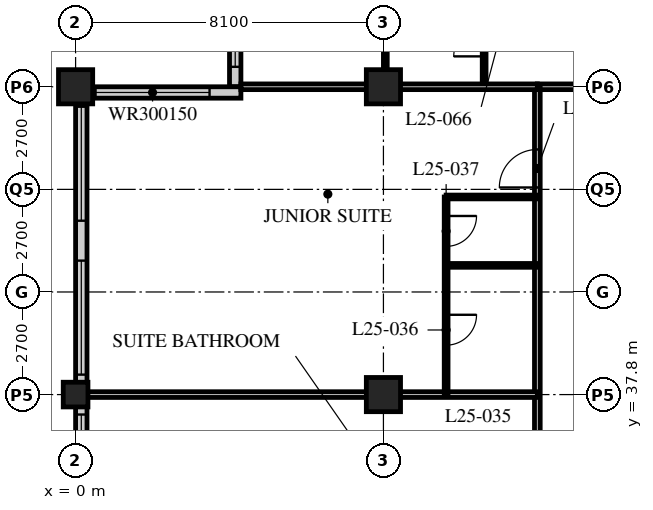
"""IFC4 building model, lengths in metres.
Left out: names, types, materials, properties, quantities, classifications, styles, units other than length and angle.
Written with IfcOpenShell. Run it as: python <this file> out.ifc"""

import sys

from ifc_helpers import new_model, si_unit, direction, frame, frame_2d, origin, origin_2d, place, context, subcontext, project, spatial, rectangle, hollow_rectangle, extrude, element, fill, save


model = new_model("IFC4")
c1 = context("Model", 3, precision=1e-05, world=origin(), true_north=direction((0.0, 1.0)))
c2 = subcontext(c1, "Body", "Model", "MODEL_VIEW")
j1 = project(units=[si_unit("LENGTHUNIT", "METRE"), si_unit("PLANEANGLEUNIT", "RADIAN")], contexts=[c1])
p1 = place(None, origin())
s1 = spatial("IfcSite", under=j1, at=p1, CompositionType="ELEMENT")
p2 = place(p1, origin())
s2 = spatial("IfcBuilding", under=s1, at=p2, CompositionType="ELEMENT")
p3 = place(p2, frame((0.0, 0.0, 103.4)))
s3 = spatial("IfcBuildingStorey", under=s2, at=p3, CompositionType="ELEMENT", Elevation=103.4)
p4 = place(p3, frame((0.0, 37.8, 0.0), z_axis=(0.0, 0.0, 1.0), x_axis=(1.0, 0.0, 0.0)))
e1 = element("IfcColumn", 1, at=p4, inside=s3, PredefinedType="COLUMN", context=c2, shape_type="SweptSolid", body=[
    extrude(hollow_rectangle(XDim=0.65, YDim=0.65, WallThickness=0.055, at=origin_2d()), origin(), (0.0, 0.0, 1.0), 3.4),
])
p5 = place(p3, frame((0.0, 45.9, 0.0), z_axis=(0.0, 0.0, 1.0), x_axis=(1.0, 0.0, 0.0)))
e2 = element("IfcColumn", 2, at=p5, inside=s3, PredefinedType="COLUMN", context=c2, shape_type="SweptSolid", body=[
    extrude(hollow_rectangle(XDim=0.9, YDim=0.9, WallThickness=0.09, at=origin_2d()), origin(), (0.0, 0.0, 1.0), 3.4),
])
for number, where, z_axis, x_axis in (
    (3, (8.1, 37.8, 0.0), (0.0, 0.0, 1.0), (1.0, 0.0, 0.0)),
    (4, (8.1, 45.9, 0.0), (0.0, 0.0, 1.0), (1.0, 0.0, 0.0)),
):
    element("IfcColumn", number, at=place(p3, frame(where, z_axis=z_axis, x_axis=x_axis)), inside=s3, PredefinedType="COLUMN", context=c2, shape_type="SweptSolid", body=[
        extrude(hollow_rectangle(XDim=0.9, YDim=0.9, WallThickness=0.1, at=origin_2d()), origin(), (0.0, 0.0, 1.0), 3.4),
    ])
p6 = place(p3, frame((4.2, 49.65, 0.0), z_axis=(0.0, 0.0, 1.0), x_axis=(0.0, -1.0, 0.0)))
e5 = element("IfcWall", 5, at=p6, inside=s3, PredefinedType="SOLIDWALL", context=c2, shape_type="SweptSolid", body=[
    extrude(rectangle(XDim=3.75, YDim=0.3, at=frame_2d((1.875, 0.0))), origin(), (0.0, 0.0, 1.0), 3.19),
])
p7 = place(p6, frame((0.225, 0.0, 0.9)))
e6 = element("IfcOpeningElement", 6, at=p7, cuts=e5, PredefinedType="OPENING", context=c2, shape_type="SweptSolid", body=[
    extrude(rectangle(XDim=3.0, YDim=1.5, at=frame_2d((1.5, 0.75))), frame((0.0, 0.16, 0.0), z_axis=(0.0, -1.0, 0.0), x_axis=(1.0, 0.0, 0.0)), (0.0, 0.0, 1.0), 0.32),
])
p8 = place(p3, frame((4.35, 45.75, 0.0), z_axis=(0.0, 0.0, 1.0), x_axis=(-1.0, 0.0, 0.0)))
e7 = element("IfcWall", 7, at=p8, inside=s3, PredefinedType="SOLIDWALL", context=c2, shape_type="SweptSolid", body=[
    extrude(rectangle(XDim=4.35, YDim=0.3, at=frame_2d((2.175, 0.0))), origin(), (0.0, 0.0, 1.0), 3.19),
])
p9 = place(p8, frame((0.825, 0.0, 0.9)))
e8 = element("IfcOpeningElement", 8, at=p9, cuts=e7, PredefinedType="OPENING", context=c2, shape_type="SweptSolid", body=[
    extrude(rectangle(XDim=3.0, YDim=1.5, at=frame_2d((1.5, 0.75))), frame((0.0, 0.16, 0.0), z_axis=(0.0, -1.0, 0.0), x_axis=(1.0, 0.0, 0.0)), (0.0, 0.0, 1.0), 0.32),
])
p10 = place(p3, frame((0.15, 45.6, 0.0), z_axis=(0.0, 0.0, 1.0), x_axis=(0.0, -1.0, 0.0)))
e9 = element("IfcWall", 9, at=p10, inside=s3, PredefinedType="SOLIDWALL", context=c2, shape_type="SweptSolid", body=[
    extrude(rectangle(XDim=32.1, YDim=0.3, at=frame_2d((16.05, 0.0))), origin(), (0.0, 0.0, 1.0), 3.19),
])
p11 = place(p10, frame((0.225, 0.0, 0.9)))
e10 = element("IfcOpeningElement", 10, at=p11, cuts=e9, PredefinedType="OPENING", context=c2, shape_type="SweptSolid", body=[
    extrude(rectangle(XDim=3.0, YDim=2.0, at=frame_2d((1.5, 1.0))), frame((0.0, 0.16, 0.0), z_axis=(0.0, -1.0, 0.0), x_axis=(1.0, 0.0, 0.0)), (0.0, 0.0, 1.0), 0.32),
])
p12 = place(p10, frame((4.275, 0.0, 0.9)))
e11 = element("IfcOpeningElement", 11, at=p12, cuts=e9, PredefinedType="OPENING", context=c2, shape_type="SweptSolid", body=[
    extrude(rectangle(XDim=3.0, YDim=2.0, at=frame_2d((1.5, 1.0))), frame((0.0, 0.16, 0.0), z_axis=(0.0, -1.0, 0.0), x_axis=(1.0, 0.0, 0.0)), (0.0, 0.0, 1.0), 0.32),
])
p13 = place(p10, frame((8.325, 0.0, 0.9)))
e12 = element("IfcOpeningElement", 12, at=p13, cuts=e9, PredefinedType="OPENING", context=c2, shape_type="SweptSolid", body=[
    extrude(rectangle(XDim=3.0, YDim=2.0, at=frame_2d((1.5, 1.0))), frame((0.0, 0.16, 0.0), z_axis=(0.0, -1.0, 0.0), x_axis=(1.0, 0.0, 0.0)), (0.0, 0.0, 1.0), 0.32),
])
p14 = place(p10, frame((12.375, 0.0, 0.9)))
e13 = element("IfcOpeningElement", 13, at=p14, cuts=e9, PredefinedType="OPENING", context=c2, shape_type="SweptSolid", body=[
    extrude(rectangle(XDim=3.0, YDim=2.0, at=frame_2d((1.5, 1.0))), frame((0.0, 0.16, 0.0), z_axis=(0.0, -1.0, 0.0), x_axis=(1.0, 0.0, 0.0)), (0.0, 0.0, 1.0), 0.32),
])
p15 = place(p10, frame((16.425, 0.0, 0.9)))
e14 = element("IfcOpeningElement", 14, at=p15, cuts=e9, PredefinedType="OPENING", context=c2, shape_type="SweptSolid", body=[
    extrude(rectangle(XDim=3.0, YDim=2.0, at=frame_2d((1.5, 1.0))), frame((0.0, 0.16, 0.0), z_axis=(0.0, -1.0, 0.0), x_axis=(1.0, 0.0, 0.0)), (0.0, 0.0, 1.0), 0.32),
])
p16 = place(p10, frame((20.475, 0.0, 0.9)))
e15 = element("IfcOpeningElement", 15, at=p16, cuts=e9, PredefinedType="OPENING", context=c2, shape_type="SweptSolid", body=[
    extrude(rectangle(XDim=3.0, YDim=2.0, at=frame_2d((1.5, 1.0))), frame((0.0, 0.16, 0.0), z_axis=(0.0, -1.0, 0.0), x_axis=(1.0, 0.0, 0.0)), (0.0, 0.0, 1.0), 0.32),
])
p17 = place(p10, frame((24.525, 0.0, 0.9)))
e16 = element("IfcOpeningElement", 16, at=p17, cuts=e9, PredefinedType="OPENING", context=c2, shape_type="SweptSolid", body=[
    extrude(rectangle(XDim=3.0, YDim=2.0, at=frame_2d((1.5, 1.0))), frame((0.0, 0.16, 0.0), z_axis=(0.0, -1.0, 0.0), x_axis=(1.0, 0.0, 0.0)), (0.0, 0.0, 1.0), 0.32),
])
p18 = place(p10, frame((28.575, 0.0, 0.9)))
e17 = element("IfcOpeningElement", 17, at=p18, cuts=e9, PredefinedType="OPENING", context=c2, shape_type="SweptSolid", body=[
    extrude(rectangle(XDim=3.0, YDim=2.0, at=frame_2d((1.5, 1.0))), frame((0.0, 0.16, 0.0), z_axis=(0.0, -1.0, 0.0), x_axis=(1.0, 0.0, 0.0)), (0.0, 0.0, 1.0), 0.32),
])
p19 = place(p3, frame((12.15, 45.9, 0.0), z_axis=(0.0, 0.0, 1.0), x_axis=(1.0, 0.0, 0.0)))
e18 = element("IfcWall", 18, at=p19, inside=s3, PredefinedType="PARTITIONING", context=c2, shape_type="SweptSolid", body=[
    extrude(rectangle(XDim=32.4, YDim=0.15, at=frame_2d((16.2, 0.0))), origin(), (0.0, 0.0, 1.0), 2.578),
])
p20 = place(p19, frame((9.5, 0.0, 0.0)))
e19 = element("IfcOpeningElement", 19, at=p20, cuts=e18, PredefinedType="OPENING", context=c2, shape_type="SweptSolid", body=[
    extrude(rectangle(XDim=1.0, YDim=2.1, at=frame_2d((0.5, 1.05))), frame((0.0, 0.085, 0.0), z_axis=(0.0, -1.0, 0.0), x_axis=(1.0, 0.0, 0.0)), (0.0, 0.0, 1.0), 0.17),
])
p21 = place(p19, frame((17.6, 0.0, 0.0)))
e20 = element("IfcOpeningElement", 20, at=p21, cuts=e18, PredefinedType="OPENING", context=c2, shape_type="SweptSolid", body=[
    extrude(rectangle(XDim=1.0, YDim=2.1, at=frame_2d((0.5, 1.05))), frame((0.0, 0.085, 0.0), z_axis=(0.0, -1.0, 0.0), x_axis=(1.0, 0.0, 0.0)), (0.0, 0.0, 1.0), 0.17),
])
p22 = place(p19, frame((25.7, 0.0, 0.0)))
e21 = element("IfcOpeningElement", 21, at=p22, cuts=e18, PredefinedType="OPENING", context=c2, shape_type="SweptSolid", body=[
    extrude(rectangle(XDim=1.0, YDim=2.1, at=frame_2d((0.5, 1.05))), frame((0.0, 0.085, 0.0), z_axis=(0.0, -1.0, 0.0), x_axis=(1.0, 0.0, 0.0)), (0.0, 0.0, 1.0), 0.17),
])
p23 = place(p19, frame((29.875, 0.0, 0.0)))
e22 = element("IfcOpeningElement", 22, at=p23, cuts=e18, PredefinedType="OPENING", context=c2, shape_type="SweptSolid", body=[
    extrude(rectangle(XDim=1.0, YDim=2.1, at=frame_2d((0.5, 1.05))), frame((0.0, 0.085, 0.0), z_axis=(0.0, -1.0, 0.0), x_axis=(1.0, 0.0, 0.0)), (0.0, 0.0, 1.0), 0.17),
])
p24 = place(p19, frame((1.525, 0.0, 0.0)))
e23 = element("IfcOpeningElement", 23, at=p24, cuts=e18, PredefinedType="OPENING", context=c2, shape_type="SweptSolid", body=[
    extrude(rectangle(XDim=1.0, YDim=2.1, at=frame_2d((0.5, 1.05))), frame((0.0, 0.085, 0.0), z_axis=(0.0, -1.0, 0.0), x_axis=(1.0, 0.0, 0.0)), (0.0, 0.0, 1.0), 0.17),
])
p25 = place(p3, frame((12.15, 21.6, 0.0), z_axis=(0.0, 0.0, 1.0), x_axis=(0.0, 1.0, 0.0)))
e24 = element("IfcWall", 24, at=p25, inside=s3, PredefinedType="PARTITIONING", context=c2, shape_type="SweptSolid", body=[
    extrude(rectangle(XDim=24.3, YDim=0.15, at=frame_2d((12.15, 0.0))), origin(), (0.0, 0.0, 1.0), 3.19),
])
p26 = place(p25, frame((5.45, 0.0, 0.0)))
e25 = element("IfcOpeningElement", 25, at=p26, cuts=e24, PredefinedType="OPENING", context=c2, shape_type="SweptSolid", body=[
    extrude(rectangle(XDim=1.0, YDim=2.1, at=frame_2d((0.5, 1.05))), frame((0.0, 0.085, 0.0), z_axis=(0.0, -1.0, 0.0), x_axis=(1.0, 0.0, 0.0)), (0.0, 0.0, 1.0), 0.17),
])
p27 = place(p25, frame((13.55, 0.0, 0.0)))
e26 = element("IfcOpeningElement", 26, at=p27, cuts=e24, PredefinedType="OPENING", context=c2, shape_type="SweptSolid", body=[
    extrude(rectangle(XDim=1.0, YDim=2.1, at=frame_2d((0.5, 1.05))), frame((0.0, 0.085, 0.0), z_axis=(0.0, -1.0, 0.0), x_axis=(1.0, 0.0, 0.0)), (0.0, 0.0, 1.0), 0.17),
])
p28 = place(p25, frame((21.65, 0.0, 0.0)))
e27 = element("IfcOpeningElement", 27, at=p28, cuts=e24, PredefinedType="OPENING", context=c2, shape_type="SweptSolid", body=[
    extrude(rectangle(XDim=1.0, YDim=2.1, at=frame_2d((0.5, 1.05))), frame((0.0, 0.085, 0.0), z_axis=(0.0, -1.0, 0.0), x_axis=(1.0, 0.0, 0.0)), (0.0, 0.0, 1.0), 0.17),
])
p29 = place(p3, frame((12.15, 37.8, 0.0), z_axis=(0.0, 0.0, 1.0), x_axis=(-1.0, 0.0, 0.0)))
e28 = element("IfcWall", 28, at=p29, inside=s3, PredefinedType="PARTITIONING", context=c2, shape_type="SweptSolid", body=[
    extrude(rectangle(XDim=11.85, YDim=0.15, at=frame_2d((5.925, 0.0))), origin(), (0.0, 0.0, 1.0), 2.578),
])
p30 = place(p3, frame((9.75, 37.8, 0.0), z_axis=(0.0, 0.0, 1.0), x_axis=(0.0, 1.0, 0.0)))
e29 = element("IfcWall", 29, at=p30, inside=s3, PredefinedType="PARTITIONING", context=c2, shape_type="SweptSolid", body=[
    extrude(rectangle(XDim=5.2, YDim=0.1, at=frame_2d((2.6, 0.0))), origin(), (0.0, 0.0, 1.0), 3.19),
])
p31 = place(p30, frame((1.3, 0.0, 0.0)))
e30 = element("IfcOpeningElement", 30, at=p31, cuts=e29, PredefinedType="OPENING", context=c2, shape_type="SweptSolid", body=[
    extrude(rectangle(XDim=0.8, YDim=2.1, at=frame_2d((0.4, 1.05))), frame((0.0, 0.06, 0.0), z_axis=(0.0, -1.0, 0.0), x_axis=(1.0, 0.0, 0.0)), (0.0, 0.0, 1.0), 0.12),
])
p32 = place(p30, frame((3.9, 0.0, 0.0)))
e31 = element("IfcOpeningElement", 31, at=p32, cuts=e29, PredefinedType="OPENING", context=c2, shape_type="SweptSolid", body=[
    extrude(rectangle(XDim=0.8, YDim=2.1, at=frame_2d((0.4, 1.05))), frame((0.0, 0.06, 0.0), z_axis=(0.0, -1.0, 0.0), x_axis=(1.0, 0.0, 0.0)), (0.0, 0.0, 1.0), 0.12),
])
for number, where, z_axis, x_axis in (
    (32, (12.15, 41.2, 0.0), (0.0, 0.0, 1.0), (-1.0, 0.0, 0.0)),
    (33, (12.15, 43.0, 0.0), (0.0, 0.0, 1.0), (-1.0, 0.0, 0.0)),
):
    element("IfcWall", number, at=place(p3, frame(where, z_axis=z_axis, x_axis=x_axis)), inside=s3, PredefinedType="PARTITIONING", context=c2, shape_type="SweptSolid", body=[
        extrude(rectangle(XDim=2.4, YDim=0.1, at=frame_2d((1.2, 0.0))), origin(), (0.0, 0.0, 1.0), 3.19),
    ])
p33 = place(p3, frame((10.75, 45.9, 0.0), z_axis=(0.0, 0.0, 1.0), x_axis=(0.0, 1.0, 0.0)))
e34 = element("IfcWall", 34, at=p33, inside=s3, PredefinedType="PARTITIONING", context=c2, shape_type="SweptSolid", body=[
    extrude(rectangle(XDim=2.4, YDim=0.1, at=frame_2d((1.2, 0.0))), origin(), (0.0, 0.0, 1.0), 3.19),
])
p34 = place(p33, frame((0.8, 0.0, 0.0)))
e35 = element("IfcOpeningElement", 35, at=p34, cuts=e34, PredefinedType="OPENING", context=c2, shape_type="SweptSolid", body=[
    extrude(rectangle(XDim=0.8, YDim=2.1, at=frame_2d((0.4, 1.05))), frame((0.0, 0.06, 0.0), z_axis=(0.0, -1.0, 0.0), x_axis=(1.0, 0.0, 0.0)), (0.0, 0.0, 1.0), 0.12),
])
p35 = place(p3, frame((8.15, 45.9, 0.0), z_axis=(0.0, 0.0, 1.0), x_axis=(0.0, 1.0, 0.0)))
e36 = element("IfcWall", 36, at=p35, inside=s3, PredefinedType="PARTITIONING", context=c2, shape_type="SweptSolid", body=[
    extrude(rectangle(XDim=2.4, YDim=0.1, at=frame_2d((1.2, 0.0))), origin(), (0.0, 0.0, 1.0), 2.64),
])
p36 = place(p3, frame((4.35, 45.9, 0.0), z_axis=(0.0, 0.0, 1.0), x_axis=(1.0, 0.0, 0.0)))
e37 = element("IfcWall", 37, at=p36, inside=s3, PredefinedType="PARTITIONING", context=c2, shape_type="SweptSolid", body=[
    extrude(rectangle(XDim=7.8, YDim=0.15, at=frame_2d((3.9, 0.0))), origin(), (0.0, 0.0, 1.0), 2.578),
])
p37 = place(p7, origin())
e38 = element("IfcWindow", 38, at=p37, inside=s3, PartitioningType="SINGLE_PANEL", PredefinedType="WINDOW", context=c2, shape_type="SweptSolid", body=[
    extrude(rectangle(XDim=3.0, YDim=1.5, at=frame_2d((1.5, 0.75))), frame((0.0, 0.03, 0.0), z_axis=(0.0, -1.0, 0.0), x_axis=(1.0, 0.0, 0.0)), (0.0, 0.0, 1.0), 0.06),
])
fill(e6, e38)
p38 = place(p9, origin())
e39 = element("IfcWindow", 39, at=p38, inside=s3, PartitioningType="SINGLE_PANEL", PredefinedType="WINDOW", context=c2, shape_type="SweptSolid", body=[
    extrude(rectangle(XDim=3.0, YDim=1.5, at=frame_2d((1.5, 0.75))), frame((0.0, 0.03, 0.0), z_axis=(0.0, -1.0, 0.0), x_axis=(1.0, 0.0, 0.0)), (0.0, 0.0, 1.0), 0.06),
])
fill(e8, e39)
p39 = place(p11, origin())
e40 = element("IfcWindow", 40, at=p39, inside=s3, PartitioningType="SINGLE_PANEL", PredefinedType="WINDOW", context=c2, shape_type="SweptSolid", body=[
    extrude(rectangle(XDim=3.0, YDim=2.0, at=frame_2d((1.5, 1.0))), frame((0.0, 0.03, 0.0), z_axis=(0.0, -1.0, 0.0), x_axis=(1.0, 0.0, 0.0)), (0.0, 0.0, 1.0), 0.06),
])
fill(e10, e40)
p40 = place(p12, origin())
e41 = element("IfcWindow", 41, at=p40, inside=s3, PartitioningType="SINGLE_PANEL", PredefinedType="WINDOW", context=c2, shape_type="SweptSolid", body=[
    extrude(rectangle(XDim=3.0, YDim=2.0, at=frame_2d((1.5, 1.0))), frame((0.0, 0.03, 0.0), z_axis=(0.0, -1.0, 0.0), x_axis=(1.0, 0.0, 0.0)), (0.0, 0.0, 1.0), 0.06),
])
fill(e11, e41)
p41 = place(p13, origin())
e42 = element("IfcWindow", 42, at=p41, inside=s3, PartitioningType="SINGLE_PANEL", PredefinedType="WINDOW", context=c2, shape_type="SweptSolid", body=[
    extrude(rectangle(XDim=3.0, YDim=2.0, at=frame_2d((1.5, 1.0))), frame((0.0, 0.03, 0.0), z_axis=(0.0, -1.0, 0.0), x_axis=(1.0, 0.0, 0.0)), (0.0, 0.0, 1.0), 0.06),
])
fill(e12, e42)
p42 = place(p31, origin())
e43 = element("IfcDoor", 43, at=p42, inside=s3, OperationType="SINGLE_SWING_LEFT", PredefinedType="DOOR", context=c2, shape_type="SweptSolid", body=[
    extrude(rectangle(XDim=0.8, YDim=2.1, at=frame_2d((0.4, 1.05))), frame((0.0, 0.025, 0.0), z_axis=(0.0, -1.0, 0.0), x_axis=(1.0, 0.0, 0.0)), (0.0, 0.0, 1.0), 0.05),
])
fill(e30, e43)
p43 = place(p32, origin())
e44 = element("IfcDoor", 44, at=p43, inside=s3, OperationType="SINGLE_SWING_LEFT", PredefinedType="DOOR", context=c2, shape_type="SweptSolid", body=[
    extrude(rectangle(XDim=0.8, YDim=2.1, at=frame_2d((0.4, 1.05))), frame((0.0, 0.025, 0.0), z_axis=(0.0, -1.0, 0.0), x_axis=(1.0, 0.0, 0.0)), (0.0, 0.0, 1.0), 0.05),
])
fill(e31, e44)
p44 = place(p28, origin())
e45 = element("IfcDoor", 45, at=p44, inside=s3, OperationType="SINGLE_SWING_LEFT", PredefinedType="DOOR", context=c2, shape_type="SweptSolid", body=[
    extrude(rectangle(XDim=1.0, YDim=2.1, at=frame_2d((0.5, 1.05))), frame((0.0, 0.025, 0.0), z_axis=(0.0, -1.0, 0.0), x_axis=(1.0, 0.0, 0.0)), (0.0, 0.0, 1.0), 0.05),
])
fill(e27, e45)
p45 = place(p34, origin())
e46 = element("IfcDoor", 46, at=p45, inside=s3, OperationType="SINGLE_SWING_LEFT", PredefinedType="DOOR", context=c2, shape_type="SweptSolid", body=[
    extrude(rectangle(XDim=0.8, YDim=2.1, at=frame_2d((0.4, 1.05))), frame((0.0, 0.025, 0.0), z_axis=(0.0, -1.0, 0.0), x_axis=(1.0, 0.0, 0.0)), (0.0, 0.0, 1.0), 0.05),
])
fill(e35, e46)
save(model, sys.argv[1])
